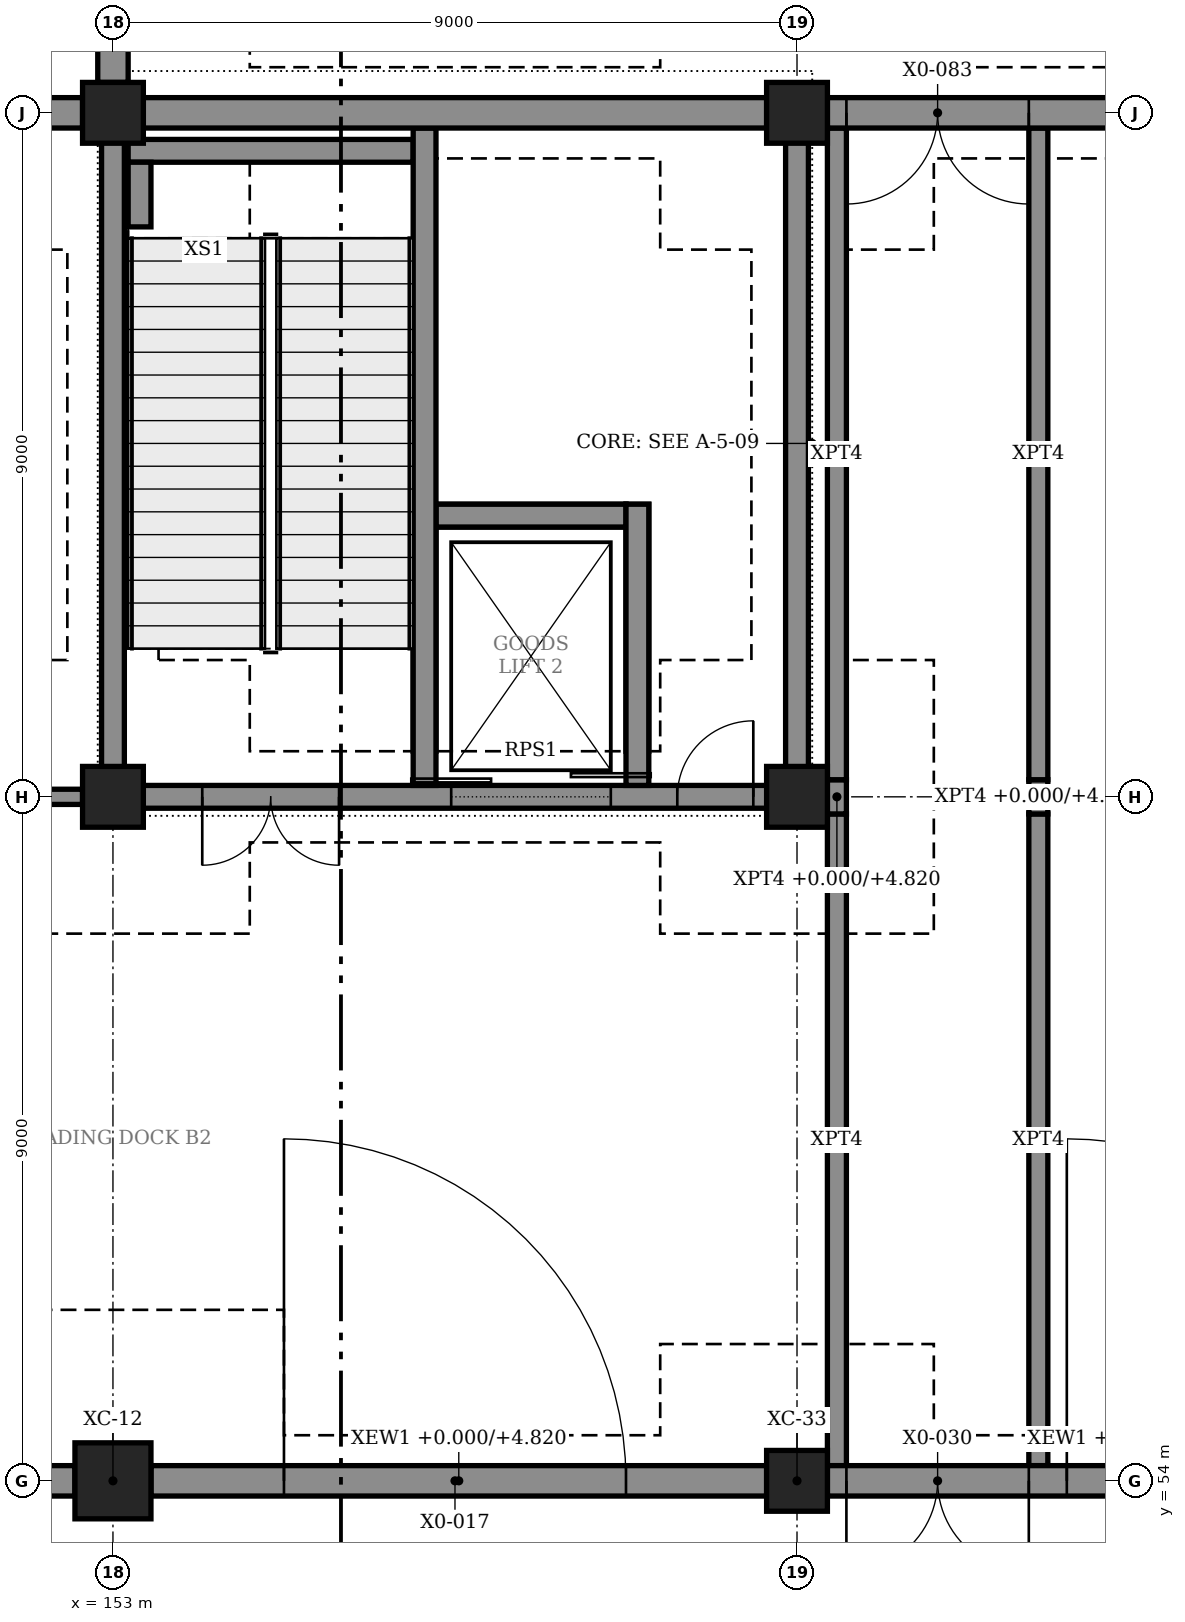
"""IFC4 building model, lengths in metres.
Left out: names, types, materials, properties, quantities, classifications, styles, units other than length and angle.
Written with IfcOpenShell. Run it as: python <this file> out.ifc"""

import sys

from ifc_helpers import new_model, si_unit, direction, frame, frame_2d, origin, origin_2d, place, context, subcontext, project, spatial, rectangle, hollow_rectangle, extrude, element, fill, save


model = new_model("IFC4")
c1 = context("Model", 3, precision=1e-05, world=origin(), true_north=direction((0.0, 1.0)))
c2 = subcontext(c1, "Body", "Model", "MODEL_VIEW")
j1 = project(units=[si_unit("LENGTHUNIT", "METRE"), si_unit("PLANEANGLEUNIT", "RADIAN")], contexts=[c1])
p1 = place(None, origin())
s1 = spatial("IfcSite", under=j1, at=p1, CompositionType="ELEMENT")
p2 = place(p1, origin())
s2 = spatial("IfcBuilding", under=s1, at=p2, CompositionType="ELEMENT")
p3 = place(p2, origin())
s3 = spatial("IfcBuildingStorey", under=s2, at=p3, CompositionType="ELEMENT", Elevation=0.0)
p4 = place(p3, frame((153.0, 54.0, 0.0), z_axis=(0.0, 0.0, 1.0), x_axis=(1.0, 0.0, 0.0)))
e1 = element("IfcColumn", 1, at=p4, inside=s3, PredefinedType="COLUMN", context=c2, shape_type="SweptSolid", body=[
    extrude(hollow_rectangle(XDim=1.0, YDim=1.0, WallThickness=0.032, at=origin_2d()), origin(), (0.0, 0.0, 1.0), 6.0),
])
for number, where, z_axis, x_axis in (
    (2, (162.0, 54.0, 0.0), (0.0, 0.0, 1.0), (1.0, 0.0, 0.0)),
    (3, (153.0, 63.0, 0.0), (0.0, 0.0, 1.0), (1.0, 0.0, 0.0)),
    (4, (162.0, 63.0, 0.0), (0.0, 0.0, 1.0), (1.0, 0.0, 0.0)),
    (5, (153.0, 72.0, 0.0), (0.0, 0.0, 1.0), (1.0, 0.0, 0.0)),
    (6, (162.0, 72.0, 0.0), (0.0, 0.0, 1.0), (1.0, 0.0, 0.0)),
):
    element("IfcColumn", number, at=place(p3, frame(where, z_axis=z_axis, x_axis=x_axis)), inside=s3, PredefinedType="COLUMN", context=c2, shape_type="SweptSolid", body=[
        extrude(rectangle(XDim=0.8, YDim=0.8, at=origin_2d()), origin(), (0.0, 0.0, 1.0), 6.0),
    ])
p5 = place(p3, frame((152.85, 63.0, 0.0), z_axis=(0.0, 0.0, 1.0), x_axis=(1.0, 0.0, 0.0)))
e7 = element("IfcWall", 7, at=p5, inside=s3, PredefinedType="SHEAR", context=c2, shape_type="SweptSolid", body=[
    extrude(rectangle(XDim=9.3, YDim=0.3, at=frame_2d((4.65, 0.0))), origin(), (0.0, 0.0, 1.0), 6.0),
])
p6 = place(p5, frame((1.325, 0.0, 0.0)))
e8 = element("IfcOpeningElement", 8, at=p6, cuts=e7, PredefinedType="OPENING", context=c2, shape_type="SweptSolid", body=[
    extrude(rectangle(XDim=1.8, YDim=2.4, at=frame_2d((0.9, 1.2))), frame((0.0, 0.16, 0.0), z_axis=(0.0, -1.0, 0.0), x_axis=(1.0, 0.0, 0.0)), (0.0, 0.0, 1.0), 0.32),
])
p7 = place(p5, frame((4.6, 0.0, 0.0)))
e9 = element("IfcOpeningElement", 9, at=p7, cuts=e7, PredefinedType="OPENING", context=c2, shape_type="SweptSolid", body=[
    extrude(rectangle(XDim=2.1, YDim=2.4, at=frame_2d((1.05, 1.2))), frame((0.0, 0.16, 0.0), z_axis=(0.0, -1.0, 0.0), x_axis=(1.0, 0.0, 0.0)), (0.0, 0.0, 1.0), 0.32),
])
p8 = place(p5, frame((7.575, 0.0, 0.0)))
e10 = element("IfcOpeningElement", 10, at=p8, cuts=e7, PredefinedType="OPENING", context=c2, shape_type="SweptSolid", body=[
    extrude(rectangle(XDim=1.0, YDim=2.4, at=frame_2d((0.5, 1.2))), frame((0.0, 0.16, 0.0), z_axis=(0.0, -1.0, 0.0), x_axis=(1.0, 0.0, 0.0)), (0.0, 0.0, 1.0), 0.32),
])
for number, where, z_axis, x_axis in (
    (11, (153.0, 63.15, 0.0), (0.0, 0.0, 1.0), (0.0, 1.0, 0.0)),
    (12, (162.0, 63.15, 0.0), (0.0, 0.0, 1.0), (0.0, 1.0, 0.0)),
):
    element("IfcWall", number, at=place(p3, frame(where, z_axis=z_axis, x_axis=x_axis)), inside=s3, PredefinedType="SHEAR", context=c2, shape_type="SweptSolid", body=[
        extrude(rectangle(XDim=8.65, YDim=0.3, at=frame_2d((4.325, 0.0))), origin(), (0.0, 0.0, 1.0), 6.0),
    ])
p9 = place(p3, frame((144.4, 54.0, 0.0), z_axis=(0.0, 0.0, 1.0), x_axis=(1.0, 0.0, 0.0)))
e13 = element("IfcWall", 13, at=p9, inside=s3, PredefinedType="SOLIDWALL", context=c2, shape_type="SweptSolid", body=[
    extrude(rectangle(XDim=8.1, YDim=0.4, at=frame_2d((4.05, 0.0))), origin(), (0.0, 0.0, 1.0), 4.82),
])
p10 = place(p9, frame((0.5, 0.0, 0.0)))
e14 = element("IfcOpeningElement", 14, at=p10, cuts=e13, PredefinedType="OPENING", context=c2, shape_type="SweptSolid", body=[
    extrude(rectangle(XDim=4.5, YDim=4.5, at=frame_2d((2.25, 2.25))), frame((0.0, 0.21, 0.0), z_axis=(0.0, -1.0, 0.0), x_axis=(1.0, 0.0, 0.0)), (0.0, 0.0, 1.0), 0.42),
])
p11 = place(p9, frame((5.55, 0.0, 0.0)))
e15 = element("IfcOpeningElement", 15, at=p11, cuts=e13, PredefinedType="OPENING", context=c2, shape_type="SweptSolid", body=[
    extrude(rectangle(XDim=2.1, YDim=2.4, at=frame_2d((1.05, 1.2))), frame((0.0, 0.21, 0.0), z_axis=(0.0, -1.0, 0.0), x_axis=(1.0, 0.0, 0.0)), (0.0, 0.0, 1.0), 0.42),
])
p12 = place(p3, frame((153.5, 54.0, 0.0), z_axis=(0.0, 0.0, 1.0), x_axis=(1.0, 0.0, 0.0)))
e16 = element("IfcWall", 16, at=p12, inside=s3, PredefinedType="SOLIDWALL", context=c2, shape_type="SweptSolid", body=[
    extrude(rectangle(XDim=8.1, YDim=0.4, at=frame_2d((4.05, 0.0))), origin(), (0.0, 0.0, 1.0), 4.82),
])
p13 = place(p12, frame((1.75, 0.0, 0.0)))
e17 = element("IfcOpeningElement", 17, at=p13, cuts=e16, PredefinedType="OPENING", context=c2, shape_type="SweptSolid", body=[
    extrude(rectangle(XDim=4.5, YDim=4.5, at=frame_2d((2.25, 2.25))), frame((0.0, 0.21, 0.0), z_axis=(0.0, -1.0, 0.0), x_axis=(1.0, 0.0, 0.0)), (0.0, 0.0, 1.0), 0.42),
])
p14 = place(p3, frame((162.4, 54.0, 0.0), z_axis=(0.0, 0.0, 1.0), x_axis=(1.0, 0.0, 0.0)))
e18 = element("IfcWall", 18, at=p14, inside=s3, PredefinedType="SOLIDWALL", context=c2, shape_type="SweptSolid", body=[
    extrude(rectangle(XDim=8.1, YDim=0.4, at=frame_2d((4.05, 0.0))), origin(), (0.0, 0.0, 1.0), 4.82),
])
p15 = place(p14, frame((3.15, 0.0, 0.0)))
e19 = element("IfcOpeningElement", 19, at=p15, cuts=e18, PredefinedType="OPENING", context=c2, shape_type="SweptSolid", body=[
    extrude(rectangle(XDim=4.5, YDim=4.5, at=frame_2d((2.25, 2.25))), frame((0.0, 0.21, 0.0), z_axis=(0.0, -1.0, 0.0), x_axis=(1.0, 0.0, 0.0)), (0.0, 0.0, 1.0), 0.42),
])
p16 = place(p14, frame((0.25, 0.0, 0.0)))
e20 = element("IfcOpeningElement", 20, at=p16, cuts=e18, PredefinedType="OPENING", context=c2, shape_type="SweptSolid", body=[
    extrude(rectangle(XDim=2.4, YDim=2.4, at=frame_2d((1.2, 1.2))), frame((0.0, 0.21, 0.0), z_axis=(0.0, -1.0, 0.0), x_axis=(1.0, 0.0, 0.0)), (0.0, 0.0, 1.0), 0.42),
])
for number, where, z_axis, x_axis in (
    (21, (144.4, 72.0, 0.0), (0.0, 0.0, 1.0), (1.0, 0.0, 0.0)),
    (22, (153.4, 72.0, 0.0), (0.0, 0.0, 1.0), (1.0, 0.0, 0.0)),
):
    element("IfcWall", number, at=place(p3, frame(where, z_axis=z_axis, x_axis=x_axis)), inside=s3, PredefinedType="SOLIDWALL", context=c2, shape_type="SweptSolid", body=[
        extrude(rectangle(XDim=8.2, YDim=0.4, at=frame_2d((4.1, 0.0))), origin(), (0.0, 0.0, 1.0), 4.82),
    ])
p17 = place(p3, frame((162.4, 72.0, 0.0), z_axis=(0.0, 0.0, 1.0), x_axis=(1.0, 0.0, 0.0)))
e23 = element("IfcWall", 23, at=p17, inside=s3, PredefinedType="SOLIDWALL", context=c2, shape_type="SweptSolid", body=[
    extrude(rectangle(XDim=8.2, YDim=0.4, at=frame_2d((4.1, 0.0))), origin(), (0.0, 0.0, 1.0), 4.82),
])
p18 = place(p17, frame((0.25, 0.0, 0.0)))
e24 = element("IfcOpeningElement", 24, at=p18, cuts=e23, PredefinedType="OPENING", context=c2, shape_type="SweptSolid", body=[
    extrude(rectangle(XDim=2.4, YDim=2.4, at=frame_2d((1.2, 1.2))), frame((0.0, 0.21, 0.0), z_axis=(0.0, -1.0, 0.0), x_axis=(1.0, 0.0, 0.0)), (0.0, 0.0, 1.0), 0.42),
])
p19 = place(p3, frame((153.0, 72.4, 0.0), z_axis=(0.0, 0.0, 1.0), x_axis=(0.0, 1.0, 0.0)))
e25 = element("IfcWall", 25, at=p19, inside=s3, PredefinedType="SOLIDWALL", context=c2, shape_type="SweptSolid", body=[
    extrude(rectangle(XDim=8.2, YDim=0.4, at=frame_2d((4.1, 0.0))), origin(), (0.0, 0.0, 1.0), 6.0),
])
p20 = place(p3, frame((153.2, 71.5, 0.0), z_axis=(0.0, 0.0, 1.0), x_axis=(1.0, 0.0, 0.0)))
e26 = element("IfcWall", 26, at=p20, inside=s3, PredefinedType="SHEAR", context=c2, shape_type="SweptSolid", body=[
    extrude(rectangle(XDim=3.75, YDim=0.3, at=frame_2d((1.875, 0.0))), origin(), (0.0, 0.0, 1.0), 2.8),
])
p21 = place(p3, frame((153.35, 70.499, 0.0), z_axis=(0.0, 0.0, 1.0), x_axis=(0.0, 1.0, 0.0)))
e27 = element("IfcWall", 27, at=p21, inside=s3, PredefinedType="SHEAR", context=c2, shape_type="SweptSolid", body=[
    extrude(rectangle(XDim=0.851, YDim=0.3, at=frame_2d((0.425, 0.0))), origin(), (0.0, 0.0, 1.0), 2.8),
])
p22 = place(p3, frame((157.1, 63.15, 0.0), z_axis=(0.0, 0.0, 1.0), x_axis=(0.0, 1.0, 0.0)))
e28 = element("IfcWall", 28, at=p22, inside=s3, PredefinedType="SHEAR", context=c2, shape_type="SweptSolid", body=[
    extrude(rectangle(XDim=8.65, YDim=0.3, at=frame_2d((4.325, 0.0))), origin(), (0.0, 0.0, 1.0), 5.72),
])
p23 = place(p3, frame((159.9, 63.15, 0.0), z_axis=(0.0, 0.0, 1.0), x_axis=(0.0, 1.0, 0.0)))
e29 = element("IfcWall", 29, at=p23, inside=s3, PredefinedType="SHEAR", context=c2, shape_type="SweptSolid", body=[
    extrude(rectangle(XDim=3.7, YDim=0.3, at=frame_2d((1.85, 0.0))), origin(), (0.0, 0.0, 1.0), 5.72),
])
p24 = place(p3, frame((157.25, 66.7, 0.0), z_axis=(0.0, 0.0, 1.0), x_axis=(1.0, 0.0, 0.0)))
e30 = element("IfcWall", 30, at=p24, inside=s3, PredefinedType="SHEAR", context=c2, shape_type="SweptSolid", body=[
    extrude(rectangle(XDim=2.5, YDim=0.3, at=frame_2d((1.25, 0.0))), origin(), (0.0, 0.0, 1.0), 5.72),
])
for number, where, z_axis, x_axis in (
    (31, (157.1, 63.6, -1.4), (0.0, 0.0, 1.0), (0.0, 1.0, 0.0)),
    (32, (159.9, 63.6, -1.4), (0.0, 0.0, 1.0), (0.0, 1.0, 0.0)),
):
    element("IfcWall", number, at=place(p3, frame(where, z_axis=z_axis, x_axis=x_axis)), inside=s3, PredefinedType="SHEAR", context=c2, shape_type="SweptSolid", body=[
        extrude(rectangle(XDim=3.25, YDim=0.3, at=frame_2d((1.625, 0.0))), origin(), (0.0, 0.0, 1.0), 1.4),
    ])
p25 = place(p3, frame((157.25, 66.7, -1.4), z_axis=(0.0, 0.0, 1.0), x_axis=(1.0, 0.0, 0.0)))
e33 = element("IfcWall", 33, at=p25, inside=s3, PredefinedType="SHEAR", context=c2, shape_type="SweptSolid", body=[
    extrude(rectangle(XDim=2.5, YDim=0.3, at=frame_2d((1.25, 0.0))), origin(), (0.0, 0.0, 1.0), 1.4),
])
p26 = place(p3, frame((144.4, 63.0, 0.0), z_axis=(0.0, 0.0, 1.0), x_axis=(1.0, 0.0, 0.0)))
e34 = element("IfcWall", 34, at=p26, inside=s3, PredefinedType="PARTITIONING", context=c2, shape_type="SweptSolid", body=[
    extrude(rectangle(XDim=8.2, YDim=0.2, at=frame_2d((4.1, 0.0))), origin(), (0.0, 0.0, 1.0), 4.82),
])
p27 = place(p26, frame((3.6, 0.0, 0.015)))
e35 = element("IfcOpeningElement", 35, at=p27, cuts=e34, PredefinedType="OPENING", context=c2, shape_type="SweptSolid", body=[
    extrude(rectangle(XDim=1.0, YDim=2.4, at=frame_2d((0.5, 1.2))), frame((0.0, 0.11, 0.0), z_axis=(0.0, -1.0, 0.0), x_axis=(1.0, 0.0, 0.0)), (0.0, 0.0, 1.0), 0.22),
])
p28 = place(p3, frame((165.3, 63.0, 0.0), z_axis=(0.0, 0.0, 1.0), x_axis=(1.0, 0.0, 0.0)))
e36 = element("IfcWall", 36, at=p28, inside=s3, PredefinedType="PARTITIONING", context=c2, shape_type="SweptSolid", body=[
    extrude(rectangle(XDim=5.3, YDim=0.2, at=frame_2d((2.65, 0.0))), origin(), (0.0, 0.0, 1.0), 4.82),
])
p29 = place(p28, frame((2.15, 0.0, 0.015)))
e37 = element("IfcOpeningElement", 37, at=p29, cuts=e36, PredefinedType="OPENING", context=c2, shape_type="SweptSolid", body=[
    extrude(rectangle(XDim=1.0, YDim=2.4, at=frame_2d((0.5, 1.2))), frame((0.0, 0.11, 0.0), z_axis=(0.0, -1.0, 0.0), x_axis=(1.0, 0.0, 0.0)), (0.0, 0.0, 1.0), 0.22),
])
p30 = place(p3, frame((162.525, 54.2, 0.0), z_axis=(0.0, 0.0, 1.0), x_axis=(0.0, 1.0, 0.0)))
e38 = element("IfcWall", 38, at=p30, inside=s3, PredefinedType="PARTITIONING", context=c2, shape_type="SweptSolid", body=[
    extrude(rectangle(XDim=8.575, YDim=0.25, at=frame_2d((4.288, 0.0))), origin(), (0.0, 0.0, 1.0), 5.72),
])
p31 = place(p3, frame((162.525, 62.775, 0.0), z_axis=(0.0, 0.0, 1.0), x_axis=(0.0, 1.0, 0.0)))
e39 = element("IfcWall", 39, at=p31, inside=s3, PredefinedType="PARTITIONING", context=c2, shape_type="SweptSolid", body=[
    extrude(rectangle(XDim=0.45, YDim=0.25, at=frame_2d((0.225, 0.0))), origin(), (0.0, 0.0, 1.0), 4.82),
])
for number, where, z_axis, x_axis in (
    (40, (162.525, 63.225, 0.0), (0.0, 0.0, 1.0), (0.0, 1.0, 0.0)),
    (41, (165.175, 54.2, 0.0), (0.0, 0.0, 1.0), (0.0, 1.0, 0.0)),
):
    element("IfcWall", number, at=place(p3, frame(where, z_axis=z_axis, x_axis=x_axis)), inside=s3, PredefinedType="PARTITIONING", context=c2, shape_type="SweptSolid", body=[
        extrude(rectangle(XDim=8.575, YDim=0.25, at=frame_2d((4.288, 0.0))), origin(), (0.0, 0.0, 1.0), 5.72),
    ])
p32 = place(p3, frame((165.175, 62.775, 0.0), z_axis=(0.0, 0.0, 1.0), x_axis=(0.0, 1.0, 0.0)))
e42 = element("IfcWall", 42, at=p32, inside=s3, PredefinedType="PARTITIONING", context=c2, shape_type="SweptSolid", body=[
    extrude(rectangle(XDim=0.45, YDim=0.25, at=frame_2d((0.225, 0.0))), origin(), (0.0, 0.0, 1.0), 4.82),
])
p33 = place(p3, frame((165.175, 63.225, 0.0), z_axis=(0.0, 0.0, 1.0), x_axis=(0.0, 1.0, 0.0)))
e43 = element("IfcWall", 43, at=p33, inside=s3, PredefinedType="PARTITIONING", context=c2, shape_type="SweptSolid", body=[
    extrude(rectangle(XDim=8.575, YDim=0.25, at=frame_2d((4.288, 0.0))), origin(), (0.0, 0.0, 1.0), 5.72),
])
p34 = place(p13, origin())
e44 = element("IfcDoor", 44, at=p34, inside=s3, OperationType="ROLLINGUP", PredefinedType="DOOR", context=c2, shape_type="SweptSolid", body=[
    extrude(rectangle(XDim=4.5, YDim=4.5, at=frame_2d((2.25, 2.25))), frame((0.0, 0.025, 0.0), z_axis=(0.0, -1.0, 0.0), x_axis=(1.0, 0.0, 0.0)), (0.0, 0.0, 1.0), 0.05),
])
fill(e17, e44)
p35 = place(p15, origin())
e45 = element("IfcDoor", 45, at=p35, inside=s3, OperationType="ROLLINGUP", PredefinedType="DOOR", context=c2, shape_type="SweptSolid", body=[
    extrude(rectangle(XDim=4.5, YDim=4.5, at=frame_2d((2.25, 2.25))), frame((0.0, 0.025, 0.0), z_axis=(0.0, -1.0, 0.0), x_axis=(1.0, 0.0, 0.0)), (0.0, 0.0, 1.0), 0.05),
])
fill(e19, e45)
p36 = place(p16, frame((2.4, 0.0, 0.0), z_axis=(0.0, 0.0, 1.0), x_axis=(-1.0, 0.0, 0.0)))
e46 = element("IfcDoor", 46, at=p36, inside=s3, OperationType="DOUBLE_DOOR_SINGLE_SWING", PredefinedType="DOOR", context=c2, shape_type="SweptSolid", body=[
    extrude(rectangle(XDim=2.4, YDim=2.4, at=frame_2d((1.2, 1.2))), frame((0.0, 0.025, 0.0), z_axis=(0.0, -1.0, 0.0), x_axis=(1.0, 0.0, 0.0)), (0.0, 0.0, 1.0), 0.05),
])
fill(e20, e46)
p37 = place(p18, frame((2.4, 0.0, 0.0), z_axis=(0.0, 0.0, 1.0), x_axis=(-1.0, 0.0, 0.0)))
e47 = element("IfcDoor", 47, at=p37, inside=s3, OperationType="DOUBLE_DOOR_SINGLE_SWING", PredefinedType="DOOR", context=c2, shape_type="SweptSolid", body=[
    extrude(rectangle(XDim=2.4, YDim=2.4, at=frame_2d((1.2, 1.2))), frame((0.0, 0.025, 0.0), z_axis=(0.0, -1.0, 0.0), x_axis=(1.0, 0.0, 0.0)), (0.0, 0.0, 1.0), 0.05),
])
fill(e24, e47)
p38 = place(p6, frame((1.8, 0.0, 0.0), z_axis=(0.0, 0.0, 1.0), x_axis=(-1.0, 0.0, 0.0)))
e48 = element("IfcDoor", 48, at=p38, inside=s3, OperationType="DOUBLE_DOOR_SINGLE_SWING", PredefinedType="DOOR", context=c2, shape_type="SweptSolid", body=[
    extrude(rectangle(XDim=1.8, YDim=2.4, at=frame_2d((0.9, 1.2))), frame((0.0, 0.025, 0.0), z_axis=(0.0, -1.0, 0.0), x_axis=(1.0, 0.0, 0.0)), (0.0, 0.0, 1.0), 0.05),
])
fill(e8, e48)
p39 = place(p7, origin())
e49 = element("IfcDoor", 49, at=p39, inside=s3, OperationType="DOUBLE_DOOR_SLIDING", PredefinedType="DOOR", context=c2, shape_type="SweptSolid", body=[
    extrude(rectangle(XDim=2.1, YDim=2.4, at=frame_2d((1.05, 1.2))), frame((0.0, 0.025, 0.0), z_axis=(0.0, -1.0, 0.0), x_axis=(1.0, 0.0, 0.0)), (0.0, 0.0, 1.0), 0.05),
])
fill(e9, e49)
p40 = place(p8, origin())
e50 = element("IfcDoor", 50, at=p40, inside=s3, OperationType="SINGLE_SWING_RIGHT", PredefinedType="DOOR", context=c2, shape_type="SweptSolid", body=[
    extrude(rectangle(XDim=1.0, YDim=2.4, at=frame_2d((0.5, 1.2))), frame((0.0, 0.025, 0.0), z_axis=(0.0, -1.0, 0.0), x_axis=(1.0, 0.0, 0.0)), (0.0, 0.0, 1.0), 0.05),
])
fill(e10, e50)
save(model, sys.argv[1])
